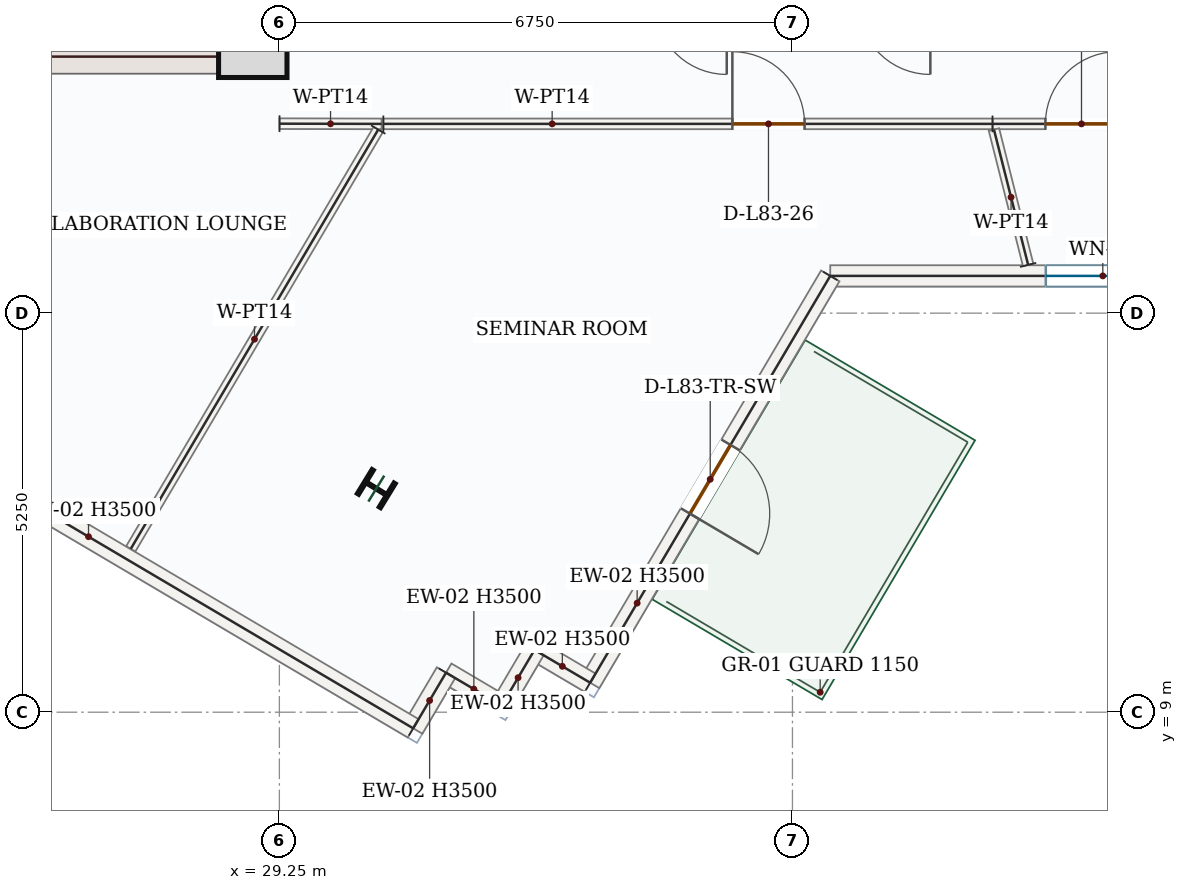
"""IFC4 building model, lengths in metres.
Left out: names, types, materials, properties, quantities, classifications, styles, units other than length and angle.
Written with IfcOpenShell. Run it as: python <this file> out.ifc"""

import sys

from ifc_helpers import new_model, si_unit, direction, frame, frame_2d, origin, origin_2d, place, context, subcontext, project, spatial, rectangle, i_section, extrude, source, transform, mapped, element, fill, save


model = new_model("IFC4")
c1 = context("Model", 3, precision=1e-05, world=origin(), true_north=direction((0.0, 1.0)))
c2 = subcontext(c1, "Body", "Model", "MODEL_VIEW")
j1 = project(units=[si_unit("LENGTHUNIT", "METRE"), si_unit("PLANEANGLEUNIT", "RADIAN")], contexts=[c1])
p1 = place(None, origin())
s1 = spatial("IfcSite", under=j1, at=p1, CompositionType="ELEMENT")
p2 = place(p1, origin())
s2 = spatial("IfcBuilding", under=s1, at=p2, CompositionType="ELEMENT")
p3 = place(p2, frame((0.0, 0.0, 342.3)))
s3 = spatial("IfcBuildingStorey", under=s2, at=p3, CompositionType="ELEMENT", Elevation=342.3)
p4 = place(p3, frame((29.025, 17.4, 0.0), z_axis=(0.0, 0.0, 1.0), x_axis=(0.0, 1.0, 0.0)))
e1 = element("IfcWall", 1, at=p4, inside=s3, PredefinedType="SHEAR", context=c2, shape_type="SweptSolid", body=[
    extrude(rectangle(XDim=8.55, YDim=0.45, at=frame_2d((4.275, 0.0))), origin(), (0.0, 0.0, 1.0), 3.5),
])
p5 = place(p4, frame((6.65, 0.0, 0.0)))
e2 = element("IfcOpeningElement", 2, at=p5, cuts=e1, PredefinedType="OPENING", context=c2, shape_type="SweptSolid", body=[
    extrude(rectangle(XDim=1.1, YDim=2.2, at=frame_2d((0.55, 1.1))), frame((0.0, 0.235, 0.0), z_axis=(0.0, -1.0, 0.0), x_axis=(1.0, 0.0, 0.0)), (0.0, 0.0, 1.0), 0.47),
])
p6 = place(p4, frame((2.7, 0.0, 0.0)))
e3 = element("IfcOpeningElement", 3, at=p6, cuts=e1, PredefinedType="OPENING", context=c2, shape_type="SweptSolid", body=[
    extrude(rectangle(XDim=0.88, YDim=2.1, at=frame_2d((0.44, 1.05))), frame((0.0, 0.235, 0.0), z_axis=(0.0, -1.0, 0.0), x_axis=(1.0, 0.0, 0.0)), (0.0, 0.0, 1.0), 0.47),
])
p7 = place(p4, frame((4.6, 0.0, 0.0)))
e4 = element("IfcOpeningElement", 4, at=p7, cuts=e1, PredefinedType="OPENING", context=c2, shape_type="SweptSolid", body=[
    extrude(rectangle(XDim=0.88, YDim=2.1, at=frame_2d((0.44, 1.05))), frame((0.0, 0.235, 0.0), z_axis=(0.0, -1.0, 0.0), x_axis=(1.0, 0.0, 0.0)), (0.0, 0.0, 1.0), 0.47),
])
m1 = source(origin(), c2, "Body", "SweptSolid", [
    extrude(rectangle(XDim=7.1, YDim=0.45, at=frame_2d((3.55, 0.0))), origin(), (0.0, 0.0, 1.0), 3.5),
])
p8 = place(p3, frame((21.7, 17.625, 0.0), z_axis=(0.0, 0.0, 1.0), x_axis=(1.0, 0.0, 0.0)))
e5 = element("IfcWall", 5, at=p8, inside=s3, PredefinedType="SHEAR", context=c2, shape_type="MappedRepresentation", body=[
    mapped(m1, transform((0.0, 0.0, 0.0), x_axis=(1.0, 0.0, 0.0), y_axis=(0.0, 1.0, 0.0), z_axis=(0.0, 0.0, 1.0), scale=1.0)),
])
m2 = source(origin(), c2, "Body", "SweptSolid", [
    extrude(rectangle(XDim=0.9, YDim=0.9, at=origin_2d()), origin(), (0.0, 0.0, 1.0), 3.75),
])
p9 = place(p3, frame((28.9, 17.8, 0.0), z_axis=(0.0, 0.0, 1.0), x_axis=(1.0, 0.0, 0.0)))
e6 = element("IfcColumn", 6, at=p9, inside=s3, PredefinedType="COLUMN", context=c2, shape_type="MappedRepresentation", body=[
    mapped(m2, transform((0.0, 0.0, 0.0), x_axis=(1.0, 0.0, 0.0), y_axis=(0.0, 1.0, 0.0), z_axis=(0.0, 0.0, 1.0), scale=1.0)),
])
m3 = source(origin(), c2, "Body", "SweptSolid", [
    extrude(i_section(OverallWidth=0.369, OverallDepth=0.356, WebThickness=0.011, FlangeThickness=0.018, FilletRadius=0.018, at=origin_2d()), origin(), (0.0, 0.0, 1.0), 3.75),
])
p10 = place(p3, frame((30.525, 11.942, 0.0), z_axis=(0.0, 0.0, 1.0), x_axis=(0.522498564716, 0.852640164354, 0.0)))
e7 = element("IfcColumn", 7, at=p10, inside=s3, PredefinedType="COLUMN", context=c2, shape_type="MappedRepresentation", body=[
    mapped(m3, transform((0.0, 0.0, 0.0), x_axis=(1.0, 0.0, 0.0), y_axis=(0.0, 1.0, 0.0), z_axis=(0.0, 0.0, 1.0), scale=1.0)),
])
p11 = place(p3, frame((43.669, 14.74, 0.0), z_axis=(0.0, 0.0, 1.0), x_axis=(-1.0, 0.0, 0.0)))
e8 = element("IfcWall", 8, at=p11, inside=s3, PredefinedType="SOLIDWALL", context=c2, shape_type="SweptSolid", body=[
    extrude(rectangle(XDim=7.172, YDim=0.28, at=frame_2d((3.586, 0.0))), origin(), (0.0, 0.0, 1.0), 3.5),
])
p12 = place(p11, frame((2.836, 0.0, 0.85)))
e9 = element("IfcOpeningElement", 9, at=p12, cuts=e8, PredefinedType="OPENING", context=c2, shape_type="SweptSolid", body=[
    extrude(rectangle(XDim=1.5, YDim=1.5, at=frame_2d((0.75, 0.75))), frame((0.0, 0.15, 0.0), z_axis=(0.0, -1.0, 0.0), x_axis=(1.0, 0.0, 0.0)), (0.0, 0.0, 1.0), 0.3),
])
p13 = place(p3, frame((36.497, 14.74, 0.0), z_axis=(0.0, 0.0, 1.0), x_axis=(-0.508266003384, -0.861200133421, 0.0)))
e10 = element("IfcWall", 10, at=p13, inside=s3, PredefinedType="SOLIDWALL", context=c2, shape_type="SweptSolid", body=[
    extrude(rectangle(XDim=6.215, YDim=0.28, at=frame_2d((3.107, 0.0))), origin(), (0.0, 0.0, 1.0), 3.5),
])
p14 = place(p13, frame((2.582, 0.0, 0.0)))
e11 = element("IfcOpeningElement", 11, at=p14, cuts=e10, PredefinedType="OPENING", context=c2, shape_type="SweptSolid", body=[
    extrude(rectangle(XDim=1.05, YDim=2.15, at=frame_2d((0.525, 1.075))), frame((0.0, 0.15, 0.0), z_axis=(0.0, -1.0, 0.0), x_axis=(1.0, 0.0, 0.0)), (0.0, 0.0, 1.0), 0.3),
])
m4 = source(origin(), c2, "Body", "SweptSolid", [
    extrude(rectangle(XDim=0.85, YDim=0.28, at=frame_2d((0.425, 0.0))), origin(), (0.0, 0.0, 1.0), 3.5),
])
for number, where, z_axis, x_axis in (
    (12, (33.339, 9.388, 0.0), (0.0, 0.0, 1.0), (-0.861, 0.508, 0.0)),
    (13, (32.606, 9.82, 0.0), (0.0, 0.0, 1.0), (-0.508, -0.861, 0.0)),
    (14, (32.175, 9.088, 0.0), (0.0, 0.0, 1.0), (-0.861, 0.508, 0.0)),
):
    element("IfcWall", number, at=place(p3, frame(where, z_axis=z_axis, x_axis=x_axis)), inside=s3, PredefinedType="SOLIDWALL", context=c2, shape_type="MappedRepresentation", body=[
        mapped(m4, transform((0.0, 0.0, 0.0), x_axis=(1.0, 0.0, 0.0), y_axis=(0.0, 1.0, 0.0), z_axis=(0.0, 0.0, 1.0), scale=1.0)),
    ])
m5 = source(origin(), c2, "Body", "SweptSolid", [
    extrude(rectangle(XDim=0.85, YDim=0.28, at=frame_2d((0.425, 0.0))), origin(), (0.0, 0.0, 1.0), 3.5),
])
p15 = place(p3, frame((31.442, 9.52, 0.0), z_axis=(0.0, 0.0, 1.0), x_axis=(-0.508187218622, -0.861246626019, 0.0)))
e15 = element("IfcWall", 15, at=p15, inside=s3, PredefinedType="SOLIDWALL", context=c2, shape_type="MappedRepresentation", body=[
    mapped(m5, transform((0.0, 0.0, 0.0), x_axis=(1.0, 0.0, 0.0), y_axis=(0.0, 1.0, 0.0), z_axis=(0.0, 0.0, 1.0), scale=1.0)),
])
m6 = source(origin(), c2, "Body", "SweptSolid", [
    extrude(rectangle(XDim=9.92, YDim=0.28, at=frame_2d((4.96, 0.0))), origin(), (0.0, 0.0, 1.0), 3.5),
])
p16 = place(p3, frame((31.01, 8.788, 0.0), z_axis=(0.0, 0.0, 1.0), x_axis=(-0.861192451778, 0.508279018848, 0.0)))
e16 = element("IfcWall", 16, at=p16, inside=s3, PredefinedType="SOLIDWALL", context=c2, shape_type="MappedRepresentation", body=[
    mapped(m6, transform((0.0, 0.0, 0.0), x_axis=(1.0, 0.0, 0.0), y_axis=(0.0, 1.0, 0.0), z_axis=(0.0, 0.0, 1.0), scale=1.0)),
])
p17 = place(p3, frame((38.632, 16.74, 0.0), z_axis=(0.0, 0.0, 1.0), x_axis=(1.0, 0.0, 0.0)))
e17 = element("IfcWall", 17, at=p17, inside=s3, PredefinedType="PARTITIONING", context=c2, shape_type="SweptSolid", body=[
    extrude(rectangle(XDim=4.112, YDim=0.14, at=frame_2d((2.056, 0.0))), origin(), (0.0, 0.0, 1.0), 3.5),
])
p18 = place(p17, frame((0.696, 0.0, 0.0)))
e18 = element("IfcOpeningElement", 18, at=p18, cuts=e17, PredefinedType="OPENING", context=c2, shape_type="SweptSolid", body=[
    extrude(rectangle(XDim=0.95, YDim=2.15, at=frame_2d((0.475, 1.075))), frame((0.0, 0.08, 0.0), z_axis=(0.0, -1.0, 0.0), x_axis=(1.0, 0.0, 0.0)), (0.0, 0.0, 1.0), 0.16),
])
m7 = source(origin(), c2, "Body", "SweptSolid", [
    extrude(rectangle(XDim=1.836, YDim=0.14, at=frame_2d((0.918, 0.0))), origin(), (0.0, 0.0, 1.0), 3.5),
])
p19 = place(p3, frame((39.101, 14.885, 0.0), z_axis=(0.0, 0.0, 1.0), x_axis=(-0.24494411221, 0.96953719985, 0.0)))
e19 = element("IfcWall", 19, at=p19, inside=s3, PredefinedType="PARTITIONING", context=c2, shape_type="MappedRepresentation", body=[
    mapped(m7, transform((0.0, 0.0, 0.0), x_axis=(1.0, 0.0, 0.0), y_axis=(0.0, 1.0, 0.0), z_axis=(0.0, 0.0, 1.0), scale=1.0)),
])
m8 = source(origin(), c2, "Body", "SweptSolid", [
    extrude(rectangle(XDim=1.343, YDim=0.14, at=frame_2d((0.671, 0.0))), origin(), (0.0, 0.0, 1.0), 3.5),
])
p20 = place(p3, frame((29.252, 16.743, 0.0), z_axis=(0.0, 0.0, 1.0), x_axis=(0.999997619843, -0.002181812989, 0.0)))
e20 = element("IfcWall", 20, at=p20, inside=s3, PredefinedType="PARTITIONING", context=c2, shape_type="MappedRepresentation", body=[
    mapped(m8, transform((0.0, 0.0, 0.0), x_axis=(1.0, 0.0, 0.0), y_axis=(0.0, 1.0, 0.0), z_axis=(0.0, 0.0, 1.0), scale=1.0)),
])
m9 = source(origin(), c2, "Body", "SweptSolid", [
    extrude(rectangle(XDim=6.405, YDim=0.14, at=frame_2d((3.202, 0.0))), origin(), (0.0, 0.0, 1.0), 3.5),
])
p21 = place(p3, frame((30.55, 16.665, 0.0), z_axis=(0.0, 0.0, 1.0), x_axis=(-0.508299006291, -0.861180654801, 0.0)))
e21 = element("IfcWall", 21, at=p21, inside=s3, PredefinedType="PARTITIONING", context=c2, shape_type="MappedRepresentation", body=[
    mapped(m9, transform((0.0, 0.0, 0.0), x_axis=(1.0, 0.0, 0.0), y_axis=(0.0, 1.0, 0.0), z_axis=(0.0, 0.0, 1.0), scale=1.0)),
])
p22 = place(p3, frame((30.618, 16.74, 0.0), z_axis=(0.0, 0.0, 1.0), x_axis=(1.0, 0.0, 0.0)))
e22 = element("IfcWall", 22, at=p22, inside=s3, PredefinedType="PARTITIONING", context=c2, shape_type="SweptSolid", body=[
    extrude(rectangle(XDim=8.014, YDim=0.14, at=frame_2d((4.007, 0.0))), origin(), (0.0, 0.0, 1.0), 3.5),
])
p23 = place(p22, frame((4.592, 0.0, 0.0)))
e23 = element("IfcOpeningElement", 23, at=p23, cuts=e22, PredefinedType="OPENING", context=c2, shape_type="SweptSolid", body=[
    extrude(rectangle(XDim=0.95, YDim=2.15, at=frame_2d((0.475, 1.075))), frame((0.0, 0.08, 0.0), z_axis=(0.0, -1.0, 0.0), x_axis=(1.0, 0.0, 0.0)), (0.0, 0.0, 1.0), 0.16),
])
m10 = source(origin(), c2, "Body", "SweptSolid", [
    extrude(rectangle(XDim=1.5, YDim=1.5, at=frame_2d((0.75, 0.75))), frame((0.0, 0.03, 0.0), z_axis=(0.0, -1.0, 0.0), x_axis=(1.0, 0.0, 0.0)), (0.0, 0.0, 1.0), 0.06),
])
p24 = place(p12, origin())
e24 = element("IfcWindow", 24, at=p24, inside=s3, PartitioningType="SINGLE_PANEL", PredefinedType="WINDOW", context=c2, shape_type="MappedRepresentation", body=[
    mapped(m10, transform((0.0, 0.0, 0.0), x_axis=(1.0, 0.0, 0.0), y_axis=(0.0, 1.0, 0.0), z_axis=(0.0, 0.0, 1.0), scale=1.0)),
])
fill(e9, e24)
m11 = source(origin(), c2, "Body", "SweptSolid", [
    extrude(rectangle(XDim=1.05, YDim=2.15, at=frame_2d((0.525, 1.075))), frame((0.0, 0.025, 0.0), z_axis=(0.0, -1.0, 0.0), x_axis=(1.0, 0.0, 0.0)), (0.0, 0.0, 1.0), 0.05),
])
p25 = place(p14, origin())
e25 = element("IfcDoor", 25, at=p25, inside=s3, OperationType="SINGLE_SWING_RIGHT", PredefinedType="DOOR", context=c2, shape_type="MappedRepresentation", body=[
    mapped(m11, transform((0.0, 0.0, 0.0), x_axis=(1.0, 0.0, 0.0), y_axis=(0.0, 1.0, 0.0), z_axis=(0.0, 0.0, 1.0), scale=1.0)),
])
fill(e11, e25)
m12 = source(origin(), c2, "Body", "SweptSolid", [
    extrude(rectangle(XDim=0.95, YDim=2.15, at=frame_2d((0.475, 1.075))), frame((0.0, 0.025, 0.0), z_axis=(0.0, -1.0, 0.0), x_axis=(1.0, 0.0, 0.0)), (0.0, 0.0, 1.0), 0.05),
])
p26 = place(p23, origin())
e26 = element("IfcDoor", 26, at=p26, inside=s3, OperationType="SINGLE_SWING_LEFT", PredefinedType="DOOR", context=c2, shape_type="MappedRepresentation", body=[
    mapped(m12, transform((0.0, 0.0, 0.0), x_axis=(1.0, 0.0, 0.0), y_axis=(0.0, 1.0, 0.0), z_axis=(0.0, 0.0, 1.0), scale=1.0)),
])
fill(e23, e26)
p27 = place(p18, origin())
e27 = element("IfcDoor", 27, at=p27, inside=s3, OperationType="SINGLE_SWING_RIGHT", PredefinedType="DOOR", context=c2, shape_type="MappedRepresentation", body=[
    mapped(m12, transform((0.0, 0.0, 0.0), x_axis=(1.0, 0.0, 0.0), y_axis=(0.0, 1.0, 0.0), z_axis=(0.0, 0.0, 1.0), scale=1.0)),
])
fill(e18, e27)
save(model, sys.argv[1])
